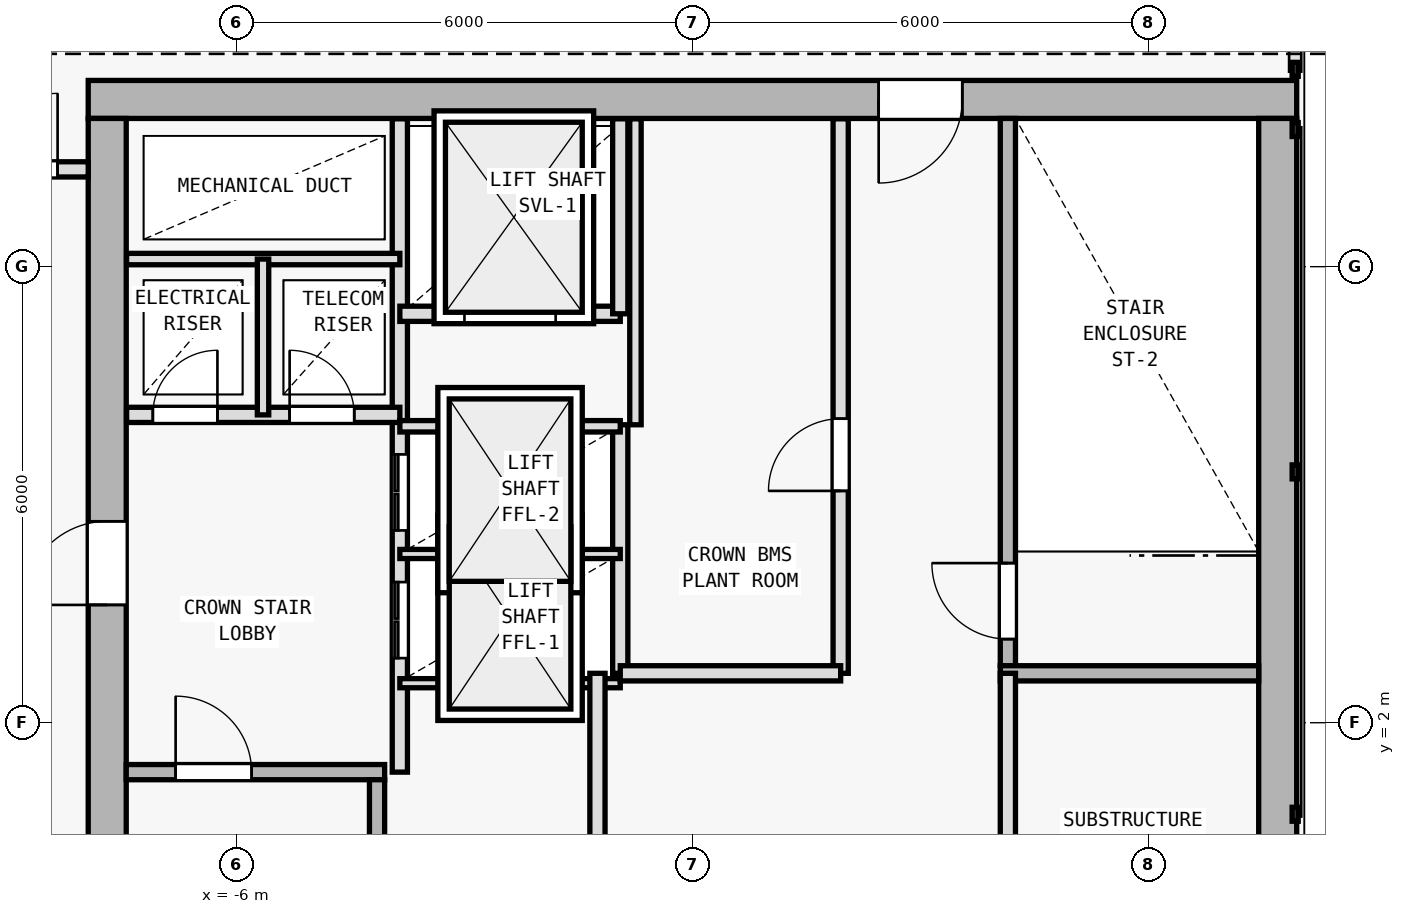
"""IFC4 building model, lengths in metres.
Left out: names, types, materials, properties, quantities, classifications, styles, units other than length and angle.
Written with IfcOpenShell. Run it as: python <this file> out.ifc"""

import sys

from ifc_helpers import new_model, si_unit, direction, frame, frame_2d, origin, origin_2d, place, context, subcontext, project, spatial, rectangle, i_section, extrude, element, fill, save


model = new_model("IFC4")
c1 = context("Model", 3, precision=1e-05, world=origin(), true_north=direction((0.0, 1.0)))
c2 = subcontext(c1, "Body", "Model", "MODEL_VIEW")
j1 = project(units=[si_unit("LENGTHUNIT", "METRE"), si_unit("PLANEANGLEUNIT", "RADIAN")], contexts=[c1])
p1 = place(None, origin())
s1 = spatial("IfcSite", under=j1, at=p1, CompositionType="ELEMENT")
p2 = place(p1, origin())
s2 = spatial("IfcBuilding", under=s1, at=p2, CompositionType="ELEMENT")
p3 = place(p2, frame((0.0, 0.0, 319.2)))
s3 = spatial("IfcBuildingStorey", under=s2, at=p3, CompositionType="ELEMENT", Elevation=319.2)
for number, where, z_axis, x_axis in (
    (1, (7.7, 10.2, 0.0), (0.0, 0.0, 1.0), (1.0, 0.0, 0.0)),
    (2, (-7.7, 10.2, 0.0), (0.0, 0.0, 1.0), (1.0, 0.0, 0.0)),
    (3, (7.7, 0.4, 0.0), (0.0, 0.0, 1.0), (1.0, 0.0, 0.0)),
    (4, (-7.7, 2.0, 0.0), (0.0, 0.0, 1.0), (1.0, 0.0, 0.0)),
):
    element("IfcColumn", number, at=place(p3, frame(where, z_axis=z_axis, x_axis=x_axis)), inside=s3, PredefinedType="COLUMN", context=c2, shape_type="SweptSolid", body=[
        extrude(i_section(OverallWidth=0.374, OverallDepth=0.372, WebThickness=0.012, FlangeThickness=0.02, FilletRadius=0.015, at=origin_2d()), origin(), (0.0, 0.0, 1.0), 3.6),
    ])
p4 = place(p3, frame((-22.517, -9.441, 0.0), z_axis=(0.0, 0.0, 1.0), x_axis=(0.562470833944, 0.826817126675, 0.0)))
e5 = element("IfcWall", 5, at=p4, inside=s3, PredefinedType="SOLIDWALL", context=c2, shape_type="SweptSolid", body=[
    extrude(rectangle(XDim=36.623, YDim=0.22, at=frame_2d((18.312, 0.0))), origin(), (0.0, 0.0, 1.0), 2.447),
])
p5 = place(p3, frame((7.95, 10.2, 0.0), z_axis=(0.0, 0.0, 1.0), x_axis=(-1.0, 0.0, 0.0)))
e6 = element("IfcWall", 6, at=p5, inside=s3, PredefinedType="SHEAR", context=c2, shape_type="SweptSolid", body=[
    extrude(rectangle(XDim=15.9, YDim=0.5, at=frame_2d((7.95, 0.0))), origin(), (0.0, 0.0, 1.0), 2.4),
])
p6 = place(p5, frame((4.4, 0.0, 0.0)))
e7 = element("IfcOpeningElement", 7, at=p6, cuts=e6, PredefinedType="OPENING", context=c2, shape_type="SweptSolid", body=[
    extrude(rectangle(XDim=1.1, YDim=2.15, at=frame_2d((0.55, 1.075))), frame((0.0, 0.26, 0.0), z_axis=(0.0, -1.0, 0.0), x_axis=(1.0, 0.0, 0.0)), (0.0, 0.0, 1.0), 0.52),
])
p7 = place(p3, frame((-7.7, -9.15, 0.0), z_axis=(0.0, 0.0, 1.0), x_axis=(0.0, 1.0, 0.0)))
e8 = element("IfcWall", 8, at=p7, inside=s3, PredefinedType="SHEAR", context=c2, shape_type="SweptSolid", body=[
    extrude(rectangle(XDim=19.1, YDim=0.5, at=frame_2d((9.55, 0.0))), origin(), (0.0, 0.0, 1.0), 2.4),
])
p8 = place(p7, frame((12.7, 0.0, 0.0)))
e9 = element("IfcOpeningElement", 9, at=p8, cuts=e8, PredefinedType="OPENING", context=c2, shape_type="SweptSolid", body=[
    extrude(rectangle(XDim=1.1, YDim=2.15, at=frame_2d((0.55, 1.075))), frame((0.0, 0.26, 0.0), z_axis=(0.0, -1.0, 0.0), x_axis=(1.0, 0.0, 0.0)), (0.0, 0.0, 1.0), 0.52),
])
p9 = place(p3, frame((7.7, 9.95, 0.0), z_axis=(0.0, 0.0, 1.0), x_axis=(0.0, -1.0, 0.0)))
e10 = element("IfcWall", 10, at=p9, inside=s3, PredefinedType="SHEAR", context=c2, shape_type="SweptSolid", body=[
    extrude(rectangle(XDim=19.1, YDim=0.5, at=frame_2d((9.55, 0.0))), origin(), (0.0, 0.0, 1.0), 2.4),
])
p10 = place(p3, frame((-7.45, 1.35, 0.0), z_axis=(0.0, 0.0, 1.0), x_axis=(1.0, 0.0, 0.0)))
e11 = element("IfcWall", 11, at=p10, inside=s3, PredefinedType="SOLIDWALL", context=c2, shape_type="SweptSolid", body=[
    extrude(rectangle(XDim=3.4, YDim=0.2, at=frame_2d((1.7, 0.0))), origin(), (0.0, 0.0, 1.0), 2.4),
])
p11 = place(p10, frame((0.65, 0.0, 0.0)))
e12 = element("IfcOpeningElement", 12, at=p11, cuts=e11, PredefinedType="OPENING", context=c2, shape_type="SweptSolid", body=[
    extrude(rectangle(XDim=1.0, YDim=2.15, at=frame_2d((0.5, 1.075))), frame((0.0, 0.11, 0.0), z_axis=(0.0, -1.0, 0.0), x_axis=(1.0, 0.0, 0.0)), (0.0, 0.0, 1.0), 0.22),
])
p12 = place(p3, frame((-4.15, -5.95, 0.0), z_axis=(0.0, 0.0, 1.0), x_axis=(0.0, 1.0, 0.0)))
e13 = element("IfcWall", 13, at=p12, inside=s3, PredefinedType="SOLIDWALL", context=c2, shape_type="SweptSolid", body=[
    extrude(rectangle(XDim=7.2, YDim=0.2, at=frame_2d((3.6, 0.0))), origin(), (0.0, 0.0, 1.0), 2.4),
])
p13 = place(p3, frame((-3.85, 1.35, 0.0), z_axis=(0.0, 0.0, 1.0), x_axis=(0.0, 1.0, 0.0)))
e14 = element("IfcWall", 14, at=p13, inside=s3, PredefinedType="SOLIDWALL", context=c2, shape_type="SweptSolid", body=[
    extrude(rectangle(XDim=8.595, YDim=0.2, at=frame_2d((4.297, 0.0))), origin(), (0.0, 0.0, 1.0), 2.4),
])
p14 = place(p13, frame((1.5, 0.0, 0.0)))
e15 = element("IfcOpeningElement", 15, at=p14, cuts=e14, PredefinedType="OPENING", context=c2, shape_type="SweptSolid", body=[
    extrude(rectangle(XDim=1.0, YDim=2.15, at=frame_2d((0.5, 1.075))), frame((0.0, 0.11, 0.0), z_axis=(0.0, -1.0, 0.0), x_axis=(1.0, 0.0, 0.0)), (0.0, 0.0, 1.0), 0.22),
])
p15 = place(p13, frame((3.18, 0.0, 0.0)))
e16 = element("IfcOpeningElement", 16, at=p15, cuts=e14, PredefinedType="OPENING", context=c2, shape_type="SweptSolid", body=[
    extrude(rectangle(XDim=1.0, YDim=2.15, at=frame_2d((0.5, 1.075))), frame((0.0, 0.11, 0.0), z_axis=(0.0, -1.0, 0.0), x_axis=(1.0, 0.0, 0.0)), (0.0, 0.0, 1.0), 0.22),
])
p16 = place(p3, frame((-7.445, 6.05, 0.0), z_axis=(0.0, 0.0, 1.0), x_axis=(1.0, 0.0, 0.0)))
e17 = element("IfcWall", 17, at=p16, inside=s3, PredefinedType="SOLIDWALL", context=c2, shape_type="SweptSolid", body=[
    extrude(rectangle(XDim=3.595, YDim=0.2, at=frame_2d((1.797, 0.0))), origin(), (0.0, 0.0, 1.0), 2.4),
])
p17 = place(p16, frame((0.345, 0.0, 0.0)))
e18 = element("IfcOpeningElement", 18, at=p17, cuts=e17, PredefinedType="OPENING", context=c2, shape_type="SweptSolid", body=[
    extrude(rectangle(XDim=0.85, YDim=2.1, at=frame_2d((0.425, 1.05))), frame((0.0, 0.11, 0.0), z_axis=(0.0, -1.0, 0.0), x_axis=(1.0, 0.0, 0.0)), (0.0, 0.0, 1.0), 0.22),
])
p18 = place(p16, frame((2.145, 0.0, 0.0)))
e19 = element("IfcOpeningElement", 19, at=p18, cuts=e17, PredefinedType="OPENING", context=c2, shape_type="SweptSolid", body=[
    extrude(rectangle(XDim=0.85, YDim=2.1, at=frame_2d((0.425, 1.05))), frame((0.0, 0.11, 0.0), z_axis=(0.0, -1.0, 0.0), x_axis=(1.0, 0.0, 0.0)), (0.0, 0.0, 1.0), 0.22),
])
p19 = place(p3, frame((-7.445, 8.1, 0.0), z_axis=(0.0, 0.0, 1.0), x_axis=(1.0, 0.0, 0.0)))
e20 = element("IfcWall", 20, at=p19, inside=s3, PredefinedType="PARTITIONING", context=c2, shape_type="SweptSolid", body=[
    extrude(rectangle(XDim=3.595, YDim=0.15, at=frame_2d((1.797, 0.0))), origin(), (0.0, 0.0, 1.0), 2.4),
])
p20 = place(p3, frame((-5.65, 6.05, 0.0), z_axis=(0.0, 0.0, 1.0), x_axis=(0.0, 1.0, 0.0)))
e21 = element("IfcWall", 21, at=p20, inside=s3, PredefinedType="PARTITIONING", context=c2, shape_type="SweptSolid", body=[
    extrude(rectangle(XDim=2.05, YDim=0.15, at=frame_2d((1.025, 0.0))), origin(), (0.0, 0.0, 1.0), 2.4),
])
p21 = place(p3, frame((4.15, 2.75, 0.0), z_axis=(0.0, 0.0, 1.0), x_axis=(0.0, 1.0, 0.0)))
e22 = element("IfcWall", 22, at=p21, inside=s3, PredefinedType="SOLIDWALL", context=c2, shape_type="SweptSolid", body=[
    extrude(rectangle(XDim=7.2, YDim=0.2, at=frame_2d((3.6, 0.0))), origin(), (0.0, 0.0, 1.0), 2.4),
])
p22 = place(p21, frame((0.35, 0.0, 0.0)))
e23 = element("IfcOpeningElement", 23, at=p22, cuts=e22, PredefinedType="OPENING", context=c2, shape_type="SweptSolid", body=[
    extrude(rectangle(XDim=1.0, YDim=2.15, at=frame_2d((0.5, 1.075))), frame((0.0, 0.11, 0.0), z_axis=(0.0, -1.0, 0.0), x_axis=(1.0, 0.0, 0.0)), (0.0, 0.0, 1.0), 0.22),
])
p23 = place(p3, frame((4.05, 2.65, 0.0), z_axis=(0.0, 0.0, 1.0), x_axis=(1.0, 0.0, 0.0)))
e24 = element("IfcWall", 24, at=p23, inside=s3, PredefinedType="SOLIDWALL", context=c2, shape_type="SweptSolid", body=[
    extrude(rectangle(XDim=3.4, YDim=0.2, at=frame_2d((1.7, 0.0))), origin(), (0.0, 0.0, 1.0), 2.4),
])
p24 = place(p3, frame((-0.95, 2.65, 0.0), z_axis=(0.0, 0.0, 1.0), x_axis=(0.0, 1.0, 0.0)))
e25 = element("IfcWall", 25, at=p24, inside=s3, PredefinedType="SOLIDWALL", context=c2, shape_type="SweptSolid", body=[
    extrude(rectangle(XDim=3.27, YDim=0.2, at=frame_2d((1.635, 0.0))), origin(), (0.0, 0.0, 1.0), 2.4),
])
for number, where, z_axis, x_axis in (
    (26, (-3.85, 2.52, 0.0), (0.0, 0.0, 1.0), (1.0, 0.0, 0.0)),
    (27, (-3.85, 4.22, 0.0), (0.0, 0.0, 1.0), (1.0, 0.0, 0.0)),
):
    element("IfcWall", number, at=place(p3, frame(where, z_axis=z_axis, x_axis=x_axis)), inside=s3, PredefinedType="PARTITIONING", context=c2, shape_type="SweptSolid", body=[
        extrude(rectangle(XDim=2.9, YDim=0.12, at=frame_2d((1.45, 0.0))), origin(), (0.0, 0.0, 1.0), 2.4),
    ])
p25 = place(p3, frame((-3.85, 5.9, 0.0), z_axis=(0.0, 0.0, 1.0), x_axis=(1.0, 0.0, 0.0)))
e28 = element("IfcWall", 28, at=p25, inside=s3, PredefinedType="PARTITIONING", context=c2, shape_type="SweptSolid", body=[
    extrude(rectangle(XDim=2.9, YDim=0.15, at=frame_2d((1.45, 0.0))), origin(), (0.0, 0.0, 1.0), 2.4),
])
p26 = place(p3, frame((-3.85, 7.38, 0.0), z_axis=(0.0, 0.0, 1.0), x_axis=(1.0, 0.0, 0.0)))
e29 = element("IfcWall", 29, at=p26, inside=s3, PredefinedType="SOLIDWALL", context=c2, shape_type="SweptSolid", body=[
    extrude(rectangle(XDim=2.9, YDim=0.2, at=frame_2d((1.45, 0.0))), origin(), (0.0, 0.0, 1.0), 2.4),
])
p27 = place(p26, frame((0.85, 0.0, 0.0)))
e30 = element("IfcOpeningElement", 30, at=p27, cuts=e29, PredefinedType="OPENING", context=c2, shape_type="SweptSolid", body=[
    extrude(rectangle(XDim=1.2, YDim=2.2, at=frame_2d((0.6, 1.1))), frame((0.0, 0.11, 0.0), z_axis=(0.0, -1.0, 0.0), x_axis=(1.0, 0.0, 0.0)), (0.0, 0.0, 1.0), 0.22),
])
p28 = place(p3, frame((-0.95, 7.38, 0.0), z_axis=(0.0, 0.0, 1.0), x_axis=(0.0, 1.0, 0.0)))
e31 = element("IfcWall", 31, at=p28, inside=s3, PredefinedType="SOLIDWALL", context=c2, shape_type="SweptSolid", body=[
    extrude(rectangle(XDim=2.565, YDim=0.2, at=frame_2d((1.283, 0.0))), origin(), (0.0, 0.0, 1.0), 2.4),
])
p29 = place(p3, frame((4.15, -6.05, 0.0), z_axis=(0.0, 0.0, 1.0), x_axis=(0.0, 1.0, 0.0)))
e32 = element("IfcWall", 32, at=p29, inside=s3, PredefinedType="SOLIDWALL", context=c2, shape_type="SweptSolid", body=[
    extrude(rectangle(XDim=8.7, YDim=0.2, at=frame_2d((4.35, 0.0))), origin(), (0.0, 0.0, 1.0), 2.4),
])
p30 = place(p29, frame((3.6, 0.0, 0.0)))
e33 = element("IfcOpeningElement", 33, at=p30, cuts=e32, PredefinedType="OPENING", context=c2, shape_type="SweptSolid", body=[
    extrude(rectangle(XDim=0.95, YDim=2.1, at=frame_2d((0.475, 1.05))), frame((0.0, 0.11, 0.0), z_axis=(0.0, -1.0, 0.0), x_axis=(1.0, 0.0, 0.0)), (0.0, 0.0, 1.0), 0.22),
])
p31 = place(p3, frame((-1.25, -6.05, 0.0), z_axis=(0.0, 0.0, 1.0), x_axis=(0.0, 1.0, 0.0)))
e34 = element("IfcWall", 34, at=p31, inside=s3, PredefinedType="SOLIDWALL", context=c2, shape_type="SweptSolid", body=[
    extrude(rectangle(XDim=8.7, YDim=0.2, at=frame_2d((4.35, 0.0))), origin(), (0.0, 0.0, 1.0), 2.4),
])
p32 = place(p31, frame((3.4, 0.0, 0.0)))
e35 = element("IfcOpeningElement", 35, at=p32, cuts=e34, PredefinedType="OPENING", context=c2, shape_type="SweptSolid", body=[
    extrude(rectangle(XDim=0.95, YDim=2.1, at=frame_2d((0.475, 1.05))), frame((0.0, 0.11, 0.0), z_axis=(0.0, -1.0, 0.0), x_axis=(1.0, 0.0, 0.0)), (0.0, 0.0, 1.0), 0.22),
])
p33 = place(p3, frame((1.95, 2.65, 0.0), z_axis=(0.0, 0.0, 1.0), x_axis=(0.0, 1.0, 0.0)))
e36 = element("IfcWall", 36, at=p33, inside=s3, PredefinedType="SOLIDWALL", context=c2, shape_type="SweptSolid", body=[
    extrude(rectangle(XDim=7.295, YDim=0.2, at=frame_2d((3.647, 0.0))), origin(), (0.0, 0.0, 1.0), 2.4),
])
p34 = place(p33, frame((2.4, 0.0, 0.0)))
e37 = element("IfcOpeningElement", 37, at=p34, cuts=e36, PredefinedType="OPENING", context=c2, shape_type="SweptSolid", body=[
    extrude(rectangle(XDim=0.95, YDim=2.1, at=frame_2d((0.475, 1.05))), frame((0.0, 0.11, 0.0), z_axis=(0.0, -1.0, 0.0), x_axis=(1.0, 0.0, 0.0)), (0.0, 0.0, 1.0), 0.22),
])
p35 = place(p3, frame((-0.95, 2.65, 0.0), z_axis=(0.0, 0.0, 1.0), x_axis=(1.0, 0.0, 0.0)))
e38 = element("IfcWall", 38, at=p35, inside=s3, PredefinedType="SOLIDWALL", context=c2, shape_type="SweptSolid", body=[
    extrude(rectangle(XDim=2.9, YDim=0.2, at=frame_2d((1.45, 0.0))), origin(), (0.0, 0.0, 1.0), 2.4),
])
p36 = place(p3, frame((-0.75, 5.92, 0.0), z_axis=(0.0, 0.0, 1.0), x_axis=(0.0, 1.0, 0.0)))
e39 = element("IfcWall", 39, at=p36, inside=s3, PredefinedType="PARTITIONING", context=c2, shape_type="SweptSolid", body=[
    extrude(rectangle(XDim=4.025, YDim=0.15, at=frame_2d((2.013, 0.0))), origin(), (0.0, 0.0, 1.0), 2.4),
])
p37 = place(p3, frame((-9.806, 9.28, 0.0), z_axis=(0.0, 0.0, 1.0), x_axis=(1.0, 0.0, 0.0)))
e40 = element("IfcWall", 40, at=p37, inside=s3, PredefinedType="SOLIDWALL", context=c2, shape_type="SweptSolid", body=[
    extrude(rectangle(XDim=1.856, YDim=0.2, at=frame_2d((0.928, 0.0))), origin(), (0.0, 0.0, 1.0), 2.4),
])
p38 = place(p37, frame((0.453, 0.0, 0.0)))
e41 = element("IfcOpeningElement", 41, at=p38, cuts=e40, PredefinedType="OPENING", context=c2, shape_type="SweptSolid", body=[
    extrude(rectangle(XDim=1.0, YDim=2.15, at=frame_2d((0.5, 1.075))), frame((0.0, 0.11, 0.0), z_axis=(0.0, -1.0, 0.0), x_axis=(1.0, 0.0, 0.0)), (0.0, 0.0, 1.0), 0.22),
])
p39 = place(p8, origin())
e42 = element("IfcDoor", 42, at=p39, inside=s3, OperationType="SINGLE_SWING_LEFT", PredefinedType="DOOR", context=c2, shape_type="SweptSolid", body=[
    extrude(rectangle(XDim=1.1, YDim=2.15, at=frame_2d((0.55, 1.075))), frame((0.0, 0.025, 0.0), z_axis=(0.0, -1.0, 0.0), x_axis=(1.0, 0.0, 0.0)), (0.0, 0.0, 1.0), 0.05),
])
fill(e9, e42)
p40 = place(p6, origin())
e43 = element("IfcDoor", 43, at=p40, inside=s3, OperationType="SINGLE_SWING_RIGHT", PredefinedType="DOOR", context=c2, shape_type="SweptSolid", body=[
    extrude(rectangle(XDim=1.1, YDim=2.15, at=frame_2d((0.55, 1.075))), frame((0.0, 0.025, 0.0), z_axis=(0.0, -1.0, 0.0), x_axis=(1.0, 0.0, 0.0)), (0.0, 0.0, 1.0), 0.05),
])
fill(e7, e43)
p41 = place(p11, origin())
e44 = element("IfcDoor", 44, at=p41, inside=s3, OperationType="SINGLE_SWING_LEFT", PredefinedType="DOOR", context=c2, shape_type="SweptSolid", body=[
    extrude(rectangle(XDim=1.0, YDim=2.15, at=frame_2d((0.5, 1.075))), frame((0.0, 0.025, 0.0), z_axis=(0.0, -1.0, 0.0), x_axis=(1.0, 0.0, 0.0)), (0.0, 0.0, 1.0), 0.05),
])
fill(e12, e44)
p42 = place(p17, origin())
e45 = element("IfcDoor", 45, at=p42, inside=s3, OperationType="SINGLE_SWING_RIGHT", PredefinedType="DOOR", context=c2, shape_type="SweptSolid", body=[
    extrude(rectangle(XDim=0.85, YDim=2.1, at=frame_2d((0.425, 1.05))), frame((0.0, 0.025, 0.0), z_axis=(0.0, -1.0, 0.0), x_axis=(1.0, 0.0, 0.0)), (0.0, 0.0, 1.0), 0.05),
])
fill(e18, e45)
p43 = place(p18, origin())
e46 = element("IfcDoor", 46, at=p43, inside=s3, OperationType="SINGLE_SWING_LEFT", PredefinedType="DOOR", context=c2, shape_type="SweptSolid", body=[
    extrude(rectangle(XDim=0.85, YDim=2.1, at=frame_2d((0.425, 1.05))), frame((0.0, 0.025, 0.0), z_axis=(0.0, -1.0, 0.0), x_axis=(1.0, 0.0, 0.0)), (0.0, 0.0, 1.0), 0.05),
])
fill(e19, e46)
p44 = place(p22, origin())
e47 = element("IfcDoor", 47, at=p44, inside=s3, OperationType="SINGLE_SWING_RIGHT", PredefinedType="DOOR", context=c2, shape_type="SweptSolid", body=[
    extrude(rectangle(XDim=1.0, YDim=2.15, at=frame_2d((0.5, 1.075))), frame((0.0, 0.025, 0.0), z_axis=(0.0, -1.0, 0.0), x_axis=(1.0, 0.0, 0.0)), (0.0, 0.0, 1.0), 0.05),
])
fill(e23, e47)
p45 = place(p27, origin())
e48 = element("IfcDoor", 48, at=p45, inside=s3, OperationType="DOUBLE_DOOR_SLIDING", PredefinedType="DOOR", context=c2, shape_type="SweptSolid", body=[
    extrude(rectangle(XDim=1.2, YDim=2.2, at=frame_2d((0.6, 1.1))), frame((0.0, 0.025, 0.0), z_axis=(0.0, -1.0, 0.0), x_axis=(1.0, 0.0, 0.0)), (0.0, 0.0, 1.0), 0.05),
])
fill(e30, e48)
p46 = place(p34, origin())
e49 = element("IfcDoor", 49, at=p46, inside=s3, OperationType="SINGLE_SWING_LEFT", PredefinedType="DOOR", context=c2, shape_type="SweptSolid", body=[
    extrude(rectangle(XDim=0.95, YDim=2.1, at=frame_2d((0.475, 1.05))), frame((0.0, 0.025, 0.0), z_axis=(0.0, -1.0, 0.0), x_axis=(1.0, 0.0, 0.0)), (0.0, 0.0, 1.0), 0.05),
])
fill(e37, e49)
p47 = place(p14, origin())
e50 = element("IfcDoor", 50, at=p47, inside=s3, OperationType="DOUBLE_DOOR_SLIDING", PredefinedType="DOOR", context=c2, shape_type="SweptSolid", body=[
    extrude(rectangle(XDim=1.0, YDim=2.15, at=frame_2d((0.5, 1.075))), frame((0.0, 0.025, 0.0), z_axis=(0.0, -1.0, 0.0), x_axis=(1.0, 0.0, 0.0)), (0.0, 0.0, 1.0), 0.05),
])
fill(e15, e50)
p48 = place(p15, origin())
e51 = element("IfcDoor", 51, at=p48, inside=s3, OperationType="DOUBLE_DOOR_SLIDING", PredefinedType="DOOR", context=c2, shape_type="SweptSolid", body=[
    extrude(rectangle(XDim=1.0, YDim=2.15, at=frame_2d((0.5, 1.075))), frame((0.0, 0.025, 0.0), z_axis=(0.0, -1.0, 0.0), x_axis=(1.0, 0.0, 0.0)), (0.0, 0.0, 1.0), 0.05),
])
fill(e16, e51)
p49 = place(p38, origin())
e52 = element("IfcDoor", 52, at=p49, inside=s3, OperationType="SINGLE_SWING_RIGHT", PredefinedType="DOOR", context=c2, shape_type="SweptSolid", body=[
    extrude(rectangle(XDim=1.0, YDim=2.15, at=frame_2d((0.5, 1.075))), frame((0.0, 0.025, 0.0), z_axis=(0.0, -1.0, 0.0), x_axis=(1.0, 0.0, 0.0)), (0.0, 0.0, 1.0), 0.05),
])
fill(e41, e52)
save(model, sys.argv[1])
